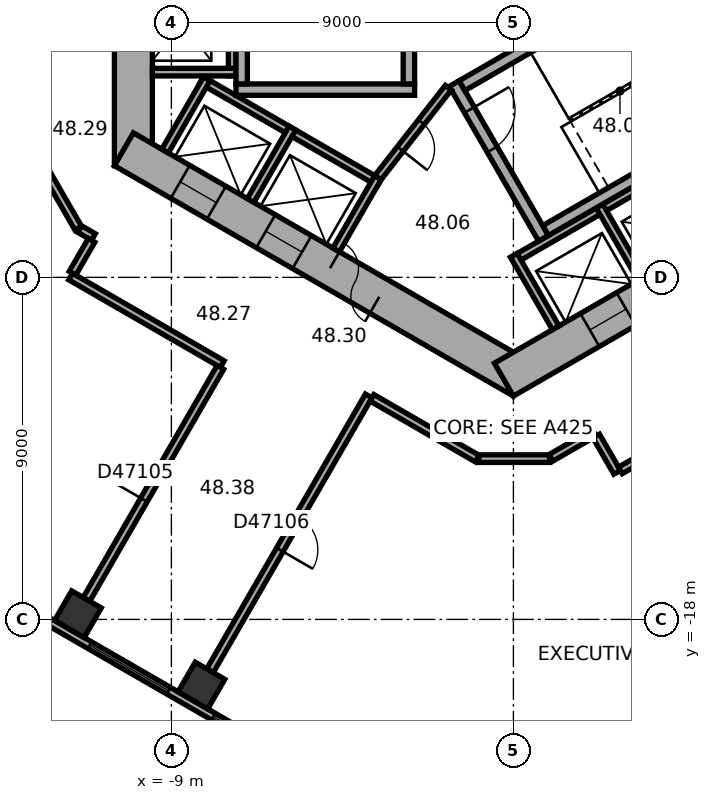
"""IFC4 building model, lengths in metres.
Left out: names, types, materials, properties, quantities, classifications, styles, units other than length and angle.
Written with IfcOpenShell. Run it as: python <this file> out.ifc"""

import sys

from ifc_helpers import new_model, si_unit, direction, frame, frame_2d, origin, origin_2d, place, context, subcontext, project, spatial, rectangle, extrude, element, fill, save


model = new_model("IFC4")
c1 = context("Model", 3, precision=1e-05, world=origin(), true_north=direction((0.0, 1.0)))
c2 = subcontext(c1, "Body", "Model", "MODEL_VIEW")
j1 = project(units=[si_unit("LENGTHUNIT", "METRE"), si_unit("PLANEANGLEUNIT", "RADIAN")], contexts=[c1])
p1 = place(None, origin())
s1 = spatial("IfcSite", under=j1, at=p1, CompositionType="ELEMENT")
p2 = place(p1, origin())
s2 = spatial("IfcBuilding", under=s1, at=p2, CompositionType="ELEMENT")
p3 = place(p2, frame((0.0, 0.0, 194.7)))
s3 = spatial("IfcBuildingStorey", under=s2, at=p3, CompositionType="ELEMENT", Elevation=194.7)
for number, where, z_axis, x_axis in (
    (1, (-11.46, -17.863, 0.0), (0.0, 0.0, 1.0), (0.866, -0.5, 0.0)),
    (2, (-8.208, -19.74, 0.0), (0.0, 0.0, 1.0), (0.866, -0.5, 0.0)),
):
    element("IfcColumn", number, at=place(p3, frame(where, z_axis=z_axis, x_axis=x_axis)), inside=s3, PredefinedType="COLUMN", context=c2, shape_type="SweptSolid", body=[
        extrude(rectangle(XDim=0.9, YDim=0.9, at=origin_2d()), origin(), (0.0, 0.0, 1.0), 3.7),
    ])
p4 = place(p3, frame((-10.0, 6.062, 0.0), z_axis=(0.0, 0.0, 1.0), x_axis=(0.0, -1.0, 0.0)))
e3 = element("IfcWall", 3, at=p4, inside=s3, PredefinedType="SHEAR", context=c2, shape_type="SweptSolid", body=[
    extrude(rectangle(XDim=12.125, YDim=1.0, at=frame_2d((6.062, 0.0))), origin(), (0.0, 0.0, 1.0), 3.7),
])
p5 = place(p4, frame((5.212, 0.0, 0.0)))
e4 = element("IfcOpeningElement", 4, at=p5, cuts=e3, PredefinedType="OPENING", context=c2, shape_type="SweptSolid", body=[
    extrude(rectangle(XDim=1.1, YDim=2.1, at=frame_2d((0.55, 1.05))), frame((0.0, 0.51, 0.0), z_axis=(0.0, -1.0, 0.0), x_axis=(1.0, 0.0, 0.0)), (0.0, 0.0, 1.0), 1.02),
])
p6 = place(p4, frame((7.812, 0.0, 0.0)))
e5 = element("IfcOpeningElement", 5, at=p6, cuts=e3, PredefinedType="OPENING", context=c2, shape_type="SweptSolid", body=[
    extrude(rectangle(XDim=1.1, YDim=2.1, at=frame_2d((0.55, 1.05))), frame((0.0, 0.51, 0.0), z_axis=(0.0, -1.0, 0.0), x_axis=(1.0, 0.0, 0.0)), (0.0, 0.0, 1.0), 1.02),
])
p7 = place(p3, frame((-10.25, -5.629, 0.0), z_axis=(0.0, 0.0, 1.0), x_axis=(0.866022616891, -0.50000482701, 0.0)))
e6 = element("IfcWall", 6, at=p7, inside=s3, PredefinedType="SHEAR", context=c2, shape_type="SweptSolid", body=[
    extrude(rectangle(XDim=12.125, YDim=1.0, at=frame_2d((6.062, 0.0))), origin(), (0.0, 0.0, 1.0), 3.7),
])
p8 = place(p7, frame((6.262, 0.0, 0.0)))
e7 = element("IfcOpeningElement", 7, at=p8, cuts=e6, PredefinedType="OPENING", context=c2, shape_type="SweptSolid", body=[
    extrude(rectangle(XDim=1.5, YDim=2.1, at=frame_2d((0.75, 1.05))), frame((0.0, 0.51, 0.0), z_axis=(0.0, -1.0, 0.0), x_axis=(1.0, 0.0, 0.0)), (0.0, 0.0, 1.0), 1.02),
])
p9 = place(p7, frame((1.712, 0.0, 0.0)))
e8 = element("IfcOpeningElement", 8, at=p9, cuts=e6, PredefinedType="OPENING", context=c2, shape_type="SweptSolid", body=[
    extrude(rectangle(XDim=1.1, YDim=2.1, at=frame_2d((0.55, 1.05))), frame((0.0, 0.51, 0.0), z_axis=(0.0, -1.0, 0.0), x_axis=(1.0, 0.0, 0.0)), (0.0, 0.0, 1.0), 1.02),
])
p10 = place(p7, frame((4.312, 0.0, 0.0)))
e9 = element("IfcOpeningElement", 9, at=p10, cuts=e6, PredefinedType="OPENING", context=c2, shape_type="SweptSolid", body=[
    extrude(rectangle(XDim=1.1, YDim=2.1, at=frame_2d((0.55, 1.05))), frame((0.0, 0.51, 0.0), z_axis=(0.0, -1.0, 0.0), x_axis=(1.0, 0.0, 0.0)), (0.0, 0.0, 1.0), 1.02),
])
p11 = place(p3, frame((-0.25, -11.691, 0.0), z_axis=(0.0, 0.0, 1.0), x_axis=(0.866022616891, 0.50000482701, 0.0)))
e10 = element("IfcWall", 10, at=p11, inside=s3, PredefinedType="SHEAR", context=c2, shape_type="SweptSolid", body=[
    extrude(rectangle(XDim=12.125, YDim=1.0, at=frame_2d((6.062, 0.0))), origin(), (0.0, 0.0, 1.0), 3.7),
])
p12 = place(p11, frame((2.612, 0.0, 0.0)))
e11 = element("IfcOpeningElement", 11, at=p12, cuts=e10, PredefinedType="OPENING", context=c2, shape_type="SweptSolid", body=[
    extrude(rectangle(XDim=1.1, YDim=2.1, at=frame_2d((0.55, 1.05))), frame((0.0, 0.51, 0.0), z_axis=(0.0, -1.0, 0.0), x_axis=(1.0, 0.0, 0.0)), (0.0, 0.0, 1.0), 1.02),
])
p13 = place(p11, frame((5.212, 0.0, 0.0)))
e12 = element("IfcOpeningElement", 12, at=p13, cuts=e10, PredefinedType="OPENING", context=c2, shape_type="SweptSolid", body=[
    extrude(rectangle(XDim=1.1, YDim=2.1, at=frame_2d((0.55, 1.05))), frame((0.0, 0.51, 0.0), z_axis=(0.0, -1.0, 0.0), x_axis=(1.0, 0.0, 0.0)), (0.0, 0.0, 1.0), 1.02),
])
p14 = place(p11, frame((7.812, 0.0, 0.0)))
e13 = element("IfcOpeningElement", 13, at=p14, cuts=e10, PredefinedType="OPENING", context=c2, shape_type="SweptSolid", body=[
    extrude(rectangle(XDim=1.1, YDim=2.1, at=frame_2d((0.55, 1.05))), frame((0.0, 0.51, 0.0), z_axis=(0.0, -1.0, 0.0), x_axis=(1.0, 0.0, 0.0)), (0.0, 0.0, 1.0), 1.02),
])
p15 = place(p3, frame((-18.789, -14.267, 0.0), z_axis=(0.0, 0.0, 1.0), x_axis=(0.866023315909, -0.500003616288, 0.0)))
e14 = element("IfcWall", 14, at=p15, inside=s3, PredefinedType="STANDARD", context=c2, shape_type="SweptSolid", body=[
    extrude(rectangle(XDim=20.044, YDim=0.2, at=frame_2d((10.022, 0.0))), origin(), (0.0, 0.0, 1.0), 3.7),
])
p16 = place(p15, frame((1.314, 0.0, 0.9)))
e15 = element("IfcOpeningElement", 15, at=p16, cuts=e14, PredefinedType="OPENING", context=c2, shape_type="SweptSolid", body=[
    extrude(rectangle(XDim=2.4, YDim=2.0, at=frame_2d((1.2, 1.0))), frame((0.0, 0.11, 0.0), z_axis=(0.0, -1.0, 0.0), x_axis=(1.0, 0.0, 0.0)), (0.0, 0.0, 1.0), 0.22),
])
p17 = place(p15, frame((5.069, 0.0, 0.9)))
e16 = element("IfcOpeningElement", 16, at=p17, cuts=e14, PredefinedType="OPENING", context=c2, shape_type="SweptSolid", body=[
    extrude(rectangle(XDim=2.4, YDim=2.0, at=frame_2d((1.2, 1.0))), frame((0.0, 0.11, 0.0), z_axis=(0.0, -1.0, 0.0), x_axis=(1.0, 0.0, 0.0)), (0.0, 0.0, 1.0), 0.22),
])
p18 = place(p15, frame((8.823, 0.0, 0.9)))
e17 = element("IfcOpeningElement", 17, at=p18, cuts=e14, PredefinedType="OPENING", context=c2, shape_type="SweptSolid", body=[
    extrude(rectangle(XDim=2.4, YDim=2.0, at=frame_2d((1.2, 1.0))), frame((0.0, 0.11, 0.0), z_axis=(0.0, -1.0, 0.0), x_axis=(1.0, 0.0, 0.0)), (0.0, 0.0, 1.0), 0.22),
])
p19 = place(p15, frame((12.577, 0.0, 0.9)))
e18 = element("IfcOpeningElement", 18, at=p19, cuts=e14, PredefinedType="OPENING", context=c2, shape_type="SweptSolid", body=[
    extrude(rectangle(XDim=2.4, YDim=2.0, at=frame_2d((1.2, 1.0))), frame((0.0, 0.11, 0.0), z_axis=(0.0, -1.0, 0.0), x_axis=(1.0, 0.0, 0.0)), (0.0, 0.0, 1.0), 0.22),
])
p20 = place(p15, frame((16.331, 0.0, 0.9)))
e19 = element("IfcOpeningElement", 19, at=p20, cuts=e14, PredefinedType="OPENING", context=c2, shape_type="SweptSolid", body=[
    extrude(rectangle(XDim=2.4, YDim=2.0, at=frame_2d((1.2, 1.0))), frame((0.0, 0.11, 0.0), z_axis=(0.0, -1.0, 0.0), x_axis=(1.0, 0.0, 0.0)), (0.0, 0.0, 1.0), 0.22),
])
p21 = place(p3, frame((2.911, -24.156, 0.0), z_axis=(0.0, 0.0, 1.0), x_axis=(0.833882163564, 0.551942512668, 0.0)))
e20 = element("IfcWall", 20, at=p21, inside=s3, PredefinedType="STANDARD", context=c2, shape_type="SweptSolid", body=[
    extrude(rectangle(XDim=20.044, YDim=0.2, at=frame_2d((10.022, 0.0))), origin(), (0.0, 0.0, 1.0), 3.7),
])
p22 = place(p21, frame((1.313, 0.0, 0.9)))
e21 = element("IfcOpeningElement", 21, at=p22, cuts=e20, PredefinedType="OPENING", context=c2, shape_type="SweptSolid", body=[
    extrude(rectangle(XDim=2.4, YDim=2.0, at=frame_2d((1.2, 1.0))), frame((0.0, 0.11, 0.0), z_axis=(0.0, -1.0, 0.0), x_axis=(1.0, 0.0, 0.0)), (0.0, 0.0, 1.0), 0.22),
])
p23 = place(p21, frame((5.067, 0.0, 0.9)))
e22 = element("IfcOpeningElement", 22, at=p23, cuts=e20, PredefinedType="OPENING", context=c2, shape_type="SweptSolid", body=[
    extrude(rectangle(XDim=2.4, YDim=2.0, at=frame_2d((1.2, 1.0))), frame((0.0, 0.11, 0.0), z_axis=(0.0, -1.0, 0.0), x_axis=(1.0, 0.0, 0.0)), (0.0, 0.0, 1.0), 0.22),
])
p24 = place(p21, frame((8.821, 0.0, 0.9)))
e23 = element("IfcOpeningElement", 23, at=p24, cuts=e20, PredefinedType="OPENING", context=c2, shape_type="SweptSolid", body=[
    extrude(rectangle(XDim=2.4, YDim=2.0, at=frame_2d((1.2, 1.0))), frame((0.0, 0.11, 0.0), z_axis=(0.0, -1.0, 0.0), x_axis=(1.0, 0.0, 0.0)), (0.0, 0.0, 1.0), 0.22),
])
p25 = place(p21, frame((12.575, 0.0, 0.9)))
e24 = element("IfcOpeningElement", 24, at=p25, cuts=e20, PredefinedType="OPENING", context=c2, shape_type="SweptSolid", body=[
    extrude(rectangle(XDim=2.4, YDim=2.0, at=frame_2d((1.2, 1.0))), frame((0.0, 0.11, 0.0), z_axis=(0.0, -1.0, 0.0), x_axis=(1.0, 0.0, 0.0)), (0.0, 0.0, 1.0), 0.22),
])
p26 = place(p21, frame((16.329, 0.0, 0.9)))
e25 = element("IfcOpeningElement", 25, at=p26, cuts=e20, PredefinedType="OPENING", context=c2, shape_type="SweptSolid", body=[
    extrude(rectangle(XDim=2.4, YDim=2.0, at=frame_2d((1.2, 1.0))), frame((0.0, 0.11, 0.0), z_axis=(0.0, -1.0, 0.0), x_axis=(1.0, 0.0, 0.0)), (0.0, 0.0, 1.0), 0.22),
])
p27 = place(p3, frame((-7.4, 4.3, 0.0), z_axis=(0.0, 0.0, 1.0), x_axis=(0.0, -1.0, 0.0)))
e26 = element("IfcWall", 26, at=p27, inside=s3, PredefinedType="PARTITIONING", context=c2, shape_type="SweptSolid", body=[
    extrude(rectangle(XDim=8.0, YDim=0.2, at=frame_2d((4.0, 0.0))), origin(), (0.0, 0.0, 1.0), 3.42),
])
p28 = place(p3, frame((-7.3, -3.6, 0.0), z_axis=(0.0, 0.0, 1.0), x_axis=(-1.0, 0.0, 0.0)))
e27 = element("IfcWall", 27, at=p28, inside=s3, PredefinedType="PARTITIONING", context=c2, shape_type="SweptSolid", body=[
    extrude(rectangle(XDim=2.2, YDim=0.2, at=frame_2d((1.1, 0.0))), origin(), (0.0, 0.0, 1.0), 3.42),
])
p29 = place(p3, frame((-8.203, -3.809, 0.0), z_axis=(0.0, 0.0, 1.0), x_axis=(0.866028230842, -0.499995103361, 0.0)))
e28 = element("IfcWall", 28, at=p29, inside=s3, PredefinedType="PARTITIONING", context=c2, shape_type="SweptSolid", body=[
    extrude(rectangle(XDim=5.4, YDim=0.2, at=frame_2d((2.7, 0.0))), origin(), (0.0, 0.0, 1.0), 3.42),
])
for number, where, z_axis, x_axis in (
    (29, (-8.067, -3.772, 0.0), (0.0, 0.0, 1.0), (-0.5, -0.866, 0.0)),
    (30, (-5.815, -5.072, 0.0), (0.0, 0.0, 1.0), (-0.5, -0.866, 0.0)),
):
    element("IfcWall", number, at=place(p3, frame(where, z_axis=z_axis, x_axis=x_axis)), inside=s3, PredefinedType="PARTITIONING", context=c2, shape_type="SweptSolid", body=[
        extrude(rectangle(XDim=2.2, YDim=0.2, at=frame_2d((1.1, 0.0))), origin(), (0.0, 0.0, 1.0), 3.42),
    ])
p30 = place(p3, frame((-3.563, -6.372, 0.0), z_axis=(0.0, 0.0, 1.0), x_axis=(-0.499994660107, -0.866028486751, 0.0)))
e31 = element("IfcWall", 31, at=p30, inside=s3, PredefinedType="PARTITIONING", context=c2, shape_type="SweptSolid", body=[
    extrude(rectangle(XDim=2.2, YDim=0.2, at=frame_2d((1.1, 0.0))), origin(), (0.0, 0.0, 1.0), 3.42),
])
p31 = place(p3, frame((-0.024, -8.559, 0.0), z_axis=(0.0, 0.0, 1.0), x_axis=(0.866026010844, 0.49999894854, 0.0)))
e32 = element("IfcWall", 32, at=p31, inside=s3, PredefinedType="PARTITIONING", context=c2, shape_type="SweptSolid", body=[
    extrude(rectangle(XDim=8.0, YDim=0.2, at=frame_2d((4.0, 0.0))), origin(), (0.0, 0.0, 1.0), 3.42),
])
for number, where, z_axis, x_axis in (
    (33, (0.013, -8.422, 0.0), (0.0, 0.0, 1.0), (0.5, -0.866, 0.0)),
    (34, (2.264, -7.122, 0.0), (0.0, 0.0, 1.0), (0.5, -0.866, 0.0)),
):
    element("IfcWall", number, at=place(p3, frame(where, z_axis=z_axis, x_axis=x_axis)), inside=s3, PredefinedType="PARTITIONING", context=c2, shape_type="SweptSolid", body=[
        extrude(rectangle(XDim=2.2, YDim=0.2, at=frame_2d((1.1, 0.0))), origin(), (0.0, 0.0, 1.0), 3.42),
    ])
p32 = place(p3, frame((-2.6, -4.06, 0.0), z_axis=(0.0, 0.0, 1.0), x_axis=(-1.0, 0.0, 0.0)))
e35 = element("IfcWall", 35, at=p32, inside=s3, PredefinedType="SHEAR", context=c2, shape_type="SweptSolid", body=[
    extrude(rectangle(XDim=4.7, YDim=0.3, at=frame_2d((2.35, 0.0))), origin(), (0.0, 0.0, 1.0), 3.42),
])
for number, where, z_axis, x_axis in (
    (36, (-2.75, 3.15, 0.0), (0.0, 0.0, 1.0), (0.0, -1.0, 0.0)),
    (37, (-7.15, 3.15, 0.0), (0.0, 0.0, 1.0), (0.0, -1.0, 0.0)),
):
    element("IfcWall", number, at=place(p3, frame(where, z_axis=z_axis, x_axis=x_axis)), inside=s3, PredefinedType="SHEAR", context=c2, shape_type="SweptSolid", body=[
        extrude(rectangle(XDim=7.06, YDim=0.3, at=frame_2d((3.53, 0.0))), origin(), (0.0, 0.0, 1.0), 3.42),
    ])
p33 = place(p3, frame((-1.558, -3.902, 0.0), z_axis=(0.0, 0.0, 1.0), x_axis=(0.499977259774, -0.866038532462, 0.0)))
e38 = element("IfcWall", 38, at=p33, inside=s3, PredefinedType="SHEAR", context=c2, shape_type="SweptSolid", body=[
    extrude(rectangle(XDim=4.7, YDim=0.3, at=frame_2d((2.35, 0.0))), origin(), (0.0, 0.0, 1.0), 3.42),
])
p34 = place(p33, frame((0.8, 0.0, 0.0)))
e39 = element("IfcOpeningElement", 39, at=p34, cuts=e38, PredefinedType="OPENING", context=c2, shape_type="SweptSolid", body=[
    extrude(rectangle(XDim=1.2, YDim=2.1, at=frame_2d((0.6, 1.05))), frame((0.0, 0.16, 0.0), z_axis=(0.0, -1.0, 0.0), x_axis=(1.0, 0.0, 0.0)), (0.0, 0.0, 1.0), 0.32),
])
for number, where, z_axis, x_axis in (
    (40, (-1.353, -3.957, 0.0), (0.0, 0.0, 1.0), (0.866, 0.5, 0.0)),
    (41, (0.847, -7.767, 0.0), (0.0, 0.0, 1.0), (0.866, 0.5, 0.0)),
):
    element("IfcWall", number, at=place(p3, frame(where, z_axis=z_axis, x_axis=x_axis)), inside=s3, PredefinedType="SHEAR", context=c2, shape_type="SweptSolid", body=[
        extrude(rectangle(XDim=7.06, YDim=0.3, at=frame_2d((3.53, 0.0))), origin(), (0.0, 0.0, 1.0), 3.42),
    ])
p35 = place(p3, frame((-1.712, -4.008, 0.0), z_axis=(0.0, 0.0, 1.0), x_axis=(-0.616549420702, -0.787316208287, 0.0)))
e42 = element("IfcWall", 42, at=p35, inside=s3, PredefinedType="PARTITIONING", context=c2, shape_type="SweptSolid", body=[
    extrude(rectangle(XDim=3.002, YDim=0.2, at=frame_2d((1.501, 0.0))), origin(), (0.0, 0.0, 1.0), 3.42),
])
p36 = place(p35, frame((1.15, 0.0, 0.0)))
e43 = element("IfcOpeningElement", 43, at=p36, cuts=e42, PredefinedType="OPENING", context=c2, shape_type="SweptSolid", body=[
    extrude(rectangle(XDim=0.9, YDim=2.1, at=frame_2d((0.45, 1.05))), frame((0.0, 0.11, 0.0), z_axis=(0.0, -1.0, 0.0), x_axis=(1.0, 0.0, 0.0)), (0.0, 0.0, 1.0), 0.22),
])
p37 = place(p3, frame((-12.4, -6.062, 0.0), z_axis=(0.0, 0.0, 1.0), x_axis=(0.500022797313, -0.86601224135, 0.0)))
e44 = element("IfcWall", 44, at=p37, inside=s3, PredefinedType="PARTITIONING", context=c2, shape_type="SweptSolid", body=[
    extrude(rectangle(XDim=1.9, YDim=0.2, at=frame_2d((0.95, 0.0))), origin(), (0.0, 0.0, 1.0), 3.42),
])
p38 = place(p3, frame((-11.651, -8.978, 0.0), z_axis=(0.0, 0.0, 1.0), x_axis=(0.866010893236, -0.500025132165, 0.0)))
e45 = element("IfcWall", 45, at=p38, inside=s3, PredefinedType="PARTITIONING", context=c2, shape_type="SweptSolid", body=[
    extrude(rectangle(XDim=4.608, YDim=0.2, at=frame_2d((2.304, 0.0))), origin(), (0.0, 0.0, 1.0), 3.42),
])
p39 = place(p3, frame((-11.415, -7.728, 0.0), z_axis=(0.0, 0.0, 1.0), x_axis=(0.865915281873, -0.500190688257, 0.0)))
e46 = element("IfcWall", 46, at=p39, inside=s3, PredefinedType="PARTITIONING", context=c2, shape_type="SweptSolid", body=[
    extrude(rectangle(XDim=0.421, YDim=0.2, at=frame_2d((0.21, 0.0))), origin(), (0.0, 0.0, 1.0), 3.42),
])
p40 = place(p3, frame((-11.235, -17.474, 0.0), z_axis=(0.0, 0.0, 1.0), x_axis=(0.500009260695, 0.866020057054, 0.0)))
e47 = element("IfcWall", 47, at=p40, inside=s3, PredefinedType="PARTITIONING", context=c2, shape_type="SweptSolid", body=[
    extrude(rectangle(XDim=7.049, YDim=0.2, at=frame_2d((3.524, 0.0))), origin(), (0.0, 0.0, 1.0), 2.87),
])
p41 = place(p40, frame((3.024, 0.0, 0.0)))
e48 = element("IfcOpeningElement", 48, at=p41, cuts=e47, PredefinedType="OPENING", context=c2, shape_type="SweptSolid", body=[
    extrude(rectangle(XDim=1.0, YDim=2.1, at=frame_2d((0.5, 1.05))), frame((0.0, 0.11, 0.0), z_axis=(0.0, -1.0, 0.0), x_axis=(1.0, 0.0, 0.0)), (0.0, 0.0, 1.0), 0.22),
])
p42 = place(p3, frame((-11.101, -8.025, 0.0), z_axis=(0.0, 0.0, 1.0), x_axis=(-0.500074377092, -0.865982457891, 0.0)))
e49 = element("IfcWall", 49, at=p42, inside=s3, PredefinedType="PARTITIONING", context=c2, shape_type="SweptSolid", body=[
    extrude(rectangle(XDim=1.001, YDim=0.2, at=frame_2d((0.5, 0.0))), origin(), (0.0, 0.0, 1.0), 3.42),
])
p43 = place(p3, frame((-7.984, -19.351, 0.0), z_axis=(0.0, 0.0, 1.0), x_axis=(0.500010139422, 0.866019549707, 0.0)))
e50 = element("IfcWall", 50, at=p43, inside=s3, PredefinedType="PARTITIONING", context=c2, shape_type="SweptSolid", body=[
    extrude(rectangle(XDim=8.35, YDim=0.2, at=frame_2d((4.175, 0.0))), origin(), (0.0, 0.0, 1.0), 3.42),
])
p44 = place(p43, frame((3.675, 0.0, 0.0)))
e51 = element("IfcOpeningElement", 51, at=p44, cuts=e50, PredefinedType="OPENING", context=c2, shape_type="SweptSolid", body=[
    extrude(rectangle(XDim=1.0, YDim=2.1, at=frame_2d((0.5, 1.05))), frame((0.0, 0.11, 0.0), z_axis=(0.0, -1.0, 0.0), x_axis=(1.0, 0.0, 0.0)), (0.0, 0.0, 1.0), 0.22),
])
p45 = place(p3, frame((-3.722, -12.169, 0.0), z_axis=(0.0, 0.0, 1.0), x_axis=(0.866033163891, -0.499986558861, 0.0)))
e52 = element("IfcWall", 52, at=p45, inside=s3, PredefinedType="PARTITIONING", context=c2, shape_type="SweptSolid", body=[
    extrude(rectangle(XDim=3.201, YDim=0.2, at=frame_2d((1.6, 0.0))), origin(), (0.0, 0.0, 1.0), 3.42),
])
p46 = place(p3, frame((-0.91, -13.77, 0.0), z_axis=(0.0, 0.0, 1.0), x_axis=(1.0, 0.0, 0.0)))
e53 = element("IfcWall", 53, at=p46, inside=s3, PredefinedType="PARTITIONING", context=c2, shape_type="SweptSolid", body=[
    extrude(rectangle(XDim=1.86, YDim=0.2, at=frame_2d((0.93, 0.0))), origin(), (0.0, 0.0, 1.0), 3.42),
])
p47 = place(p3, frame((0.985, -13.75, 0.0), z_axis=(0.0, 0.0, 1.0), x_axis=(0.866028661061, 0.499994358189, 0.0)))
e54 = element("IfcWall", 54, at=p47, inside=s3, PredefinedType="PARTITIONING", context=c2, shape_type="SweptSolid", body=[
    extrude(rectangle(XDim=1.321, YDim=0.2, at=frame_2d((0.661, 0.0))), origin(), (0.0, 0.0, 1.0), 3.42),
])
p48 = place(p3, frame((2.179, -13.176, 0.0), z_axis=(0.0, 0.0, 1.0), x_axis=(0.499978356969, -0.866037899034, 0.0)))
e55 = element("IfcWall", 55, at=p48, inside=s3, PredefinedType="PARTITIONING", context=c2, shape_type="SweptSolid", body=[
    extrude(rectangle(XDim=1.101, YDim=0.2, at=frame_2d((0.551, 0.0))), origin(), (0.0, 0.0, 1.0), 3.42),
])
p49 = place(p3, frame((2.816, -14.079, 0.0), z_axis=(0.0, 0.0, 1.0), x_axis=(0.866021128829, 0.500007404367, 0.0)))
e56 = element("IfcWall", 56, at=p49, inside=s3, PredefinedType="PARTITIONING", context=c2, shape_type="SweptSolid", body=[
    extrude(rectangle(XDim=8.702, YDim=0.2, at=frame_2d((4.351, 0.0))), origin(), (0.0, 0.0, 1.0), 3.42),
])
p50 = place(p49, frame((5.184, 0.0, 0.0)))
e57 = element("IfcOpeningElement", 57, at=p50, cuts=e56, PredefinedType="OPENING", context=c2, shape_type="SweptSolid", body=[
    extrude(rectangle(XDim=1.0, YDim=2.1, at=frame_2d((0.5, 1.05))), frame((0.0, 0.11, 0.0), z_axis=(0.0, -1.0, 0.0), x_axis=(1.0, 0.0, 0.0)), (0.0, 0.0, 1.0), 0.22),
])
p51 = place(p18, origin())
e58 = element("IfcWindow", 58, at=p51, inside=s3, PartitioningType="SINGLE_PANEL", PredefinedType="WINDOW", context=c2, shape_type="SweptSolid", body=[
    extrude(rectangle(XDim=2.4, YDim=2.0, at=frame_2d((1.2, 1.0))), frame((0.0, 0.03, 0.0), z_axis=(0.0, -1.0, 0.0), x_axis=(1.0, 0.0, 0.0)), (0.0, 0.0, 1.0), 0.06),
])
fill(e17, e58)
p52 = place(p19, origin())
e59 = element("IfcWindow", 59, at=p52, inside=s3, PartitioningType="SINGLE_PANEL", PredefinedType="WINDOW", context=c2, shape_type="SweptSolid", body=[
    extrude(rectangle(XDim=2.4, YDim=2.0, at=frame_2d((1.2, 1.0))), frame((0.0, 0.03, 0.0), z_axis=(0.0, -1.0, 0.0), x_axis=(1.0, 0.0, 0.0)), (0.0, 0.0, 1.0), 0.06),
])
fill(e18, e59)
p53 = place(p8, origin())
e60 = element("IfcDoor", 60, at=p53, inside=s3, OperationType="DOUBLE_DOOR_SINGLE_SWING", PredefinedType="DOOR", context=c2, shape_type="SweptSolid", body=[
    extrude(rectangle(XDim=1.5, YDim=2.1, at=frame_2d((0.75, 1.05))), frame((0.0, 0.025, 0.0), z_axis=(0.0, -1.0, 0.0), x_axis=(1.0, 0.0, 0.0)), (0.0, 0.0, 1.0), 0.05),
])
fill(e7, e60)
p54 = place(p34, origin())
e61 = element("IfcDoor", 61, at=p54, inside=s3, OperationType="SINGLE_SWING_RIGHT", PredefinedType="DOOR", context=c2, shape_type="SweptSolid", body=[
    extrude(rectangle(XDim=1.2, YDim=2.1, at=frame_2d((0.6, 1.05))), frame((0.0, 0.025, 0.0), z_axis=(0.0, -1.0, 0.0), x_axis=(1.0, 0.0, 0.0)), (0.0, 0.0, 1.0), 0.05),
])
fill(e39, e61)
p55 = place(p36, origin())
e62 = element("IfcDoor", 62, at=p55, inside=s3, OperationType="SINGLE_SWING_LEFT", PredefinedType="DOOR", context=c2, shape_type="SweptSolid", body=[
    extrude(rectangle(XDim=0.9, YDim=2.1, at=frame_2d((0.45, 1.05))), frame((0.0, 0.025, 0.0), z_axis=(0.0, -1.0, 0.0), x_axis=(1.0, 0.0, 0.0)), (0.0, 0.0, 1.0), 0.05),
])
fill(e43, e62)
p56 = place(p9, origin())
e63 = element("IfcDoor", 63, at=p56, inside=s3, OperationType="DOUBLE_DOOR_SLIDING", PredefinedType="DOOR", context=c2, shape_type="SweptSolid", body=[
    extrude(rectangle(XDim=1.1, YDim=2.1, at=frame_2d((0.55, 1.05))), frame((0.0, 0.025, 0.0), z_axis=(0.0, -1.0, 0.0), x_axis=(1.0, 0.0, 0.0)), (0.0, 0.0, 1.0), 0.05),
])
fill(e8, e63)
p57 = place(p10, origin())
e64 = element("IfcDoor", 64, at=p57, inside=s3, OperationType="DOUBLE_DOOR_SLIDING", PredefinedType="DOOR", context=c2, shape_type="SweptSolid", body=[
    extrude(rectangle(XDim=1.1, YDim=2.1, at=frame_2d((0.55, 1.05))), frame((0.0, 0.025, 0.0), z_axis=(0.0, -1.0, 0.0), x_axis=(1.0, 0.0, 0.0)), (0.0, 0.0, 1.0), 0.05),
])
fill(e9, e64)
p58 = place(p12, origin())
e65 = element("IfcDoor", 65, at=p58, inside=s3, OperationType="DOUBLE_DOOR_SLIDING", PredefinedType="DOOR", context=c2, shape_type="SweptSolid", body=[
    extrude(rectangle(XDim=1.1, YDim=2.1, at=frame_2d((0.55, 1.05))), frame((0.0, 0.025, 0.0), z_axis=(0.0, -1.0, 0.0), x_axis=(1.0, 0.0, 0.0)), (0.0, 0.0, 1.0), 0.05),
])
fill(e11, e65)
p59 = place(p41, origin())
e66 = element("IfcDoor", 66, at=p59, inside=s3, OperationType="SINGLE_SWING_LEFT", PredefinedType="DOOR", context=c2, shape_type="SweptSolid", body=[
    extrude(rectangle(XDim=1.0, YDim=2.1, at=frame_2d((0.5, 1.05))), frame((0.0, 0.025, 0.0), z_axis=(0.0, -1.0, 0.0), x_axis=(1.0, 0.0, 0.0)), (0.0, 0.0, 1.0), 0.05),
])
fill(e48, e66)
p60 = place(p44, origin())
e67 = element("IfcDoor", 67, at=p60, inside=s3, OperationType="SINGLE_SWING_LEFT", PredefinedType="DOOR", context=c2, shape_type="SweptSolid", body=[
    extrude(rectangle(XDim=1.0, YDim=2.1, at=frame_2d((0.5, 1.05))), frame((0.0, 0.025, 0.0), z_axis=(0.0, -1.0, 0.0), x_axis=(1.0, 0.0, 0.0)), (0.0, 0.0, 1.0), 0.05),
])
fill(e51, e67)
save(model, sys.argv[1])
